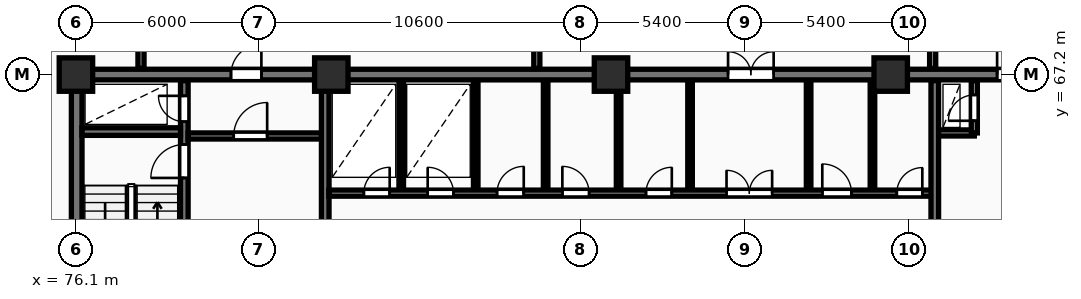
"""IFC4 building model, lengths in metres.
Left out: names, types, materials, properties, quantities, classifications, styles, units other than length and angle.
Written with IfcOpenShell. Run it as: python <this file> out.ifc"""

import sys

from ifc_helpers import new_model, si_unit, direction, frame, frame_2d, origin, origin_2d, place, context, subcontext, project, spatial, rectangle, extrude, element, fill, save


model = new_model("IFC4")
c1 = context("Model", 3, precision=1e-05, world=origin(), true_north=direction((0.0, 1.0)))
c2 = subcontext(c1, "Body", "Model", "MODEL_VIEW")
j1 = project(units=[si_unit("LENGTHUNIT", "METRE"), si_unit("PLANEANGLEUNIT", "RADIAN")], contexts=[c1])
p1 = place(None, origin())
s1 = spatial("IfcSite", under=j1, at=p1, CompositionType="ELEMENT")
p2 = place(p1, origin())
s2 = spatial("IfcBuilding", under=s1, at=p2, CompositionType="ELEMENT")
p3 = place(p2, frame((0.0, 0.0, 19.0)))
s3 = spatial("IfcBuildingStorey", under=s2, at=p3, CompositionType="ELEMENT", Elevation=19.0)
for number, where, z_axis, x_axis in (
    (1, (76.1, 67.2, 0.0), (0.0, 0.0, 1.0), (1.0, 0.0, 0.0)),
    (2, (84.5, 67.2, 0.0), (0.0, 0.0, 1.0), (1.0, 0.0, 0.0)),
    (3, (93.7, 67.2, 0.0), (0.0, 0.0, 1.0), (1.0, 0.0, 0.0)),
    (4, (102.9, 67.2, 0.0), (0.0, 0.0, 1.0), (1.0, 0.0, 0.0)),
):
    element("IfcColumn", number, at=place(p3, frame(where, z_axis=z_axis, x_axis=x_axis)), inside=s3, PredefinedType="COLUMN", context=c2, shape_type="SweptSolid", body=[
        extrude(rectangle(XDim=1.1, YDim=1.1, at=origin_2d()), origin(), (0.0, 0.0, 1.0), 5.0),
    ])
p4 = place(p3, frame((76.125, 55.375, 0.0), z_axis=(0.0, 0.0, 1.0), x_axis=(0.0, 1.0, 0.0)))
e5 = element("IfcWall", 5, at=p4, inside=s3, PredefinedType="SHEAR", context=c2, shape_type="SweptSolid", body=[
    extrude(rectangle(XDim=11.65, YDim=0.35, at=frame_2d((5.825, 0.0))), origin(), (0.0, 0.0, 1.0), 5.0),
])
p5 = place(p3, frame((75.95, 67.2, 0.0), z_axis=(0.0, 0.0, 1.0), x_axis=(1.0, 0.0, 0.0)))
e6 = element("IfcWall", 6, at=p5, inside=s3, PredefinedType="SHEAR", context=c2, shape_type="SweptSolid", body=[
    extrude(rectangle(XDim=36.3, YDim=0.35, at=frame_2d((18.15, 0.0))), origin(), (0.0, 0.0, 1.0), 5.0),
])
p6 = place(p5, frame((5.25, 0.0, 0.0)))
e7 = element("IfcOpeningElement", 7, at=p6, cuts=e6, PredefinedType="OPENING", context=c2, shape_type="SweptSolid", body=[
    extrude(rectangle(XDim=1.0, YDim=2.15, at=frame_2d((0.5, 1.075))), frame((0.0, 0.185, 0.0), z_axis=(0.0, -1.0, 0.0), x_axis=(1.0, 0.0, 0.0)), (0.0, 0.0, 1.0), 0.37),
])
p7 = place(p5, frame((21.6, 0.0, 0.0)))
e8 = element("IfcOpeningElement", 8, at=p7, cuts=e6, PredefinedType="OPENING", context=c2, shape_type="SweptSolid", body=[
    extrude(rectangle(XDim=1.5, YDim=2.2, at=frame_2d((0.75, 1.1))), frame((0.0, 0.185, 0.0), z_axis=(0.0, -1.0, 0.0), x_axis=(1.0, 0.0, 0.0)), (0.0, 0.0, 1.0), 0.37),
])
p8 = place(p5, frame((30.45, 0.0, 0.0)))
e9 = element("IfcOpeningElement", 9, at=p8, cuts=e6, PredefinedType="OPENING", context=c2, shape_type="SweptSolid", body=[
    extrude(rectangle(XDim=1.0, YDim=2.15, at=frame_2d((0.5, 1.075))), frame((0.0, 0.185, 0.0), z_axis=(0.0, -1.0, 0.0), x_axis=(1.0, 0.0, 0.0)), (0.0, 0.0, 1.0), 0.37),
])
p9 = place(p3, frame((79.665, 55.4, 0.0), z_axis=(0.0, 0.0, 1.0), x_axis=(0.0, 1.0, 0.0)))
e10 = element("IfcWall", 10, at=p9, inside=s3, PredefinedType="SHEAR", context=c2, shape_type="SweptSolid", body=[
    extrude(rectangle(XDim=11.6, YDim=0.25, at=frame_2d((5.8, 0.0))), origin(), (0.0, 0.0, 1.0), 5.0),
])
p10 = place(p9, frame((0.55, 0.0, 0.0)))
e11 = element("IfcOpeningElement", 11, at=p10, cuts=e10, PredefinedType="OPENING", context=c2, shape_type="SweptSolid", body=[
    extrude(rectangle(XDim=0.85, YDim=2.05, at=frame_2d((0.425, 1.025))), frame((0.0, 0.135, 0.0), z_axis=(0.0, -1.0, 0.0), x_axis=(1.0, 0.0, 0.0)), (0.0, 0.0, 1.0), 0.27),
])
p11 = place(p9, frame((8.4, 0.0, 0.0)))
e12 = element("IfcOpeningElement", 12, at=p11, cuts=e10, PredefinedType="OPENING", context=c2, shape_type="SweptSolid", body=[
    extrude(rectangle(XDim=1.1, YDim=2.1, at=frame_2d((0.55, 1.05))), frame((0.0, 0.135, 0.0), z_axis=(0.0, -1.0, 0.0), x_axis=(1.0, 0.0, 0.0)), (0.0, 0.0, 1.0), 0.27),
])
p12 = place(p9, frame((10.25, 0.0, 0.0)))
e13 = element("IfcOpeningElement", 13, at=p12, cuts=e10, PredefinedType="OPENING", context=c2, shape_type="SweptSolid", body=[
    extrude(rectangle(XDim=0.85, YDim=2.05, at=frame_2d((0.425, 1.025))), frame((0.0, 0.135, 0.0), z_axis=(0.0, -1.0, 0.0), x_axis=(1.0, 0.0, 0.0)), (0.0, 0.0, 1.0), 0.27),
])
p13 = place(p3, frame((76.3, 65.325, 0.0), z_axis=(0.0, 0.0, 1.0), x_axis=(1.0, 0.0, 0.0)))
e14 = element("IfcWall", 14, at=p13, inside=s3, PredefinedType="SHEAR", context=c2, shape_type="SweptSolid", body=[
    extrude(rectangle(XDim=3.24, YDim=0.25, at=frame_2d((1.62, 0.0))), origin(), (0.0, 0.0, 1.0), 5.0),
])
p14 = place(p3, frame((79.79, 65.18, 0.0), z_axis=(0.0, 0.0, 1.0), x_axis=(1.0, 0.0, 0.0)))
e15 = element("IfcWall", 15, at=p14, inside=s3, PredefinedType="PARTITIONING", context=c2, shape_type="SweptSolid", body=[
    extrude(rectangle(XDim=4.39, YDim=0.2, at=frame_2d((2.195, 0.0))), origin(), (0.0, 0.0, 1.0), 4.68),
])
p15 = place(p14, frame((1.5, 0.0, 0.0)))
e16 = element("IfcOpeningElement", 16, at=p15, cuts=e15, PredefinedType="OPENING", context=c2, shape_type="SweptSolid", body=[
    extrude(rectangle(XDim=1.1, YDim=2.1, at=frame_2d((0.55, 1.05))), frame((0.0, 0.11, 0.0), z_axis=(0.0, -1.0, 0.0), x_axis=(1.0, 0.0, 0.0)), (0.0, 0.0, 1.0), 0.22),
])
p16 = place(p3, frame((84.3, 55.4, 0.0), z_axis=(0.0, 0.0, 1.0), x_axis=(0.0, 1.0, 0.0)))
e17 = element("IfcWall", 17, at=p16, inside=s3, PredefinedType="SHEAR", context=c2, shape_type="SweptSolid", body=[
    extrude(rectangle(XDim=11.6, YDim=0.25, at=frame_2d((5.8, 0.0))), origin(), (0.0, 0.0, 1.0), 5.0),
])
p17 = place(p16, frame((5.2, 0.0, 0.0)))
e18 = element("IfcOpeningElement", 18, at=p17, cuts=e17, PredefinedType="OPENING", context=c2, shape_type="SweptSolid", body=[
    extrude(rectangle(XDim=1.1, YDim=2.1, at=frame_2d((0.55, 1.05))), frame((0.0, 0.135, 0.0), z_axis=(0.0, -1.0, 0.0), x_axis=(1.0, 0.0, 0.0)), (0.0, 0.0, 1.0), 0.27),
])
for number, where, z_axis, x_axis in (
    (19, (86.8, 63.4, 0.0), (0.0, 0.0, 1.0), (0.0, 1.0, 0.0)),
    (20, (89.25, 63.4, 0.0), (0.0, 0.0, 1.0), (0.0, 1.0, 0.0)),
    (21, (91.55, 63.4, 0.0), (0.0, 0.0, 1.0), (0.0, 1.0, 0.0)),
):
    element("IfcWall", number, at=place(p3, frame(where, z_axis=z_axis, x_axis=x_axis)), inside=s3, PredefinedType="PARTITIONING", context=c2, shape_type="SweptSolid", body=[
        extrude(rectangle(XDim=3.6, YDim=0.15, at=frame_2d((1.8, 0.0))), origin(), (0.0, 0.0, 1.0), 4.68),
    ])
for number, where, z_axis, x_axis in (
    (22, (93.95, 63.4, 0.0), (0.0, 0.0, 1.0), (0.0, 1.0, 0.0)),
    (23, (102.3, 63.4, 0.0), (0.0, 0.0, 1.0), (0.0, 1.0, 0.0)),
):
    element("IfcWall", number, at=place(p3, frame(where, z_axis=z_axis, x_axis=x_axis)), inside=s3, PredefinedType="PARTITIONING", context=c2, shape_type="SweptSolid", body=[
        extrude(rectangle(XDim=3.6, YDim=0.15, at=frame_2d((1.8, 0.0))), origin(), (0.0, 0.0, 1.0), 3.43),
    ])
for number, where, z_axis, x_axis in (
    (24, (96.3, 63.4, 0.0), (0.0, 0.0, 1.0), (0.0, 1.0, 0.0)),
    (25, (100.2, 63.4, 0.0), (0.0, 0.0, 1.0), (0.0, 1.0, 0.0)),
):
    element("IfcWall", number, at=place(p3, frame(where, z_axis=z_axis, x_axis=x_axis)), inside=s3, PredefinedType="PARTITIONING", context=c2, shape_type="SweptSolid", body=[
        extrude(rectangle(XDim=3.6, YDim=0.15, at=frame_2d((1.8, 0.0))), origin(), (0.0, 0.0, 1.0), 4.68),
    ])
p18 = place(p3, frame((84.42, 63.3, 0.0), z_axis=(0.0, 0.0, 1.0), x_axis=(1.0, 0.0, 0.0)))
e26 = element("IfcWall", 26, at=p18, inside=s3, PredefinedType="PARTITIONING", context=c2, shape_type="SweptSolid", body=[
    extrude(rectangle(XDim=19.83, YDim=0.2, at=frame_2d((9.915, 0.0))), origin(), (0.0, 0.0, 1.0), 4.68),
])
p19 = place(p18, frame((1.15, 0.0, 0.0)))
e27 = element("IfcOpeningElement", 27, at=p19, cuts=e26, PredefinedType="OPENING", context=c2, shape_type="SweptSolid", body=[
    extrude(rectangle(XDim=0.85, YDim=2.05, at=frame_2d((0.425, 1.025))), frame((0.0, 0.11, 0.0), z_axis=(0.0, -1.0, 0.0), x_axis=(1.0, 0.0, 0.0)), (0.0, 0.0, 1.0), 0.22),
])
p20 = place(p18, frame((3.25, 0.0, 0.0)))
e28 = element("IfcOpeningElement", 28, at=p20, cuts=e26, PredefinedType="OPENING", context=c2, shape_type="SweptSolid", body=[
    extrude(rectangle(XDim=0.85, YDim=2.05, at=frame_2d((0.425, 1.025))), frame((0.0, 0.11, 0.0), z_axis=(0.0, -1.0, 0.0), x_axis=(1.0, 0.0, 0.0)), (0.0, 0.0, 1.0), 0.22),
])
p21 = place(p18, frame((13.08, 0.0, 0.0)))
e29 = element("IfcOpeningElement", 29, at=p21, cuts=e26, PredefinedType="OPENING", context=c2, shape_type="SweptSolid", body=[
    extrude(rectangle(XDim=1.5, YDim=2.2, at=frame_2d((0.75, 1.1))), frame((0.0, 0.11, 0.0), z_axis=(0.0, -1.0, 0.0), x_axis=(1.0, 0.0, 0.0)), (0.0, 0.0, 1.0), 0.22),
])
p22 = place(p18, frame((5.53, 0.0, 0.0)))
e30 = element("IfcOpeningElement", 30, at=p22, cuts=e26, PredefinedType="OPENING", context=c2, shape_type="SweptSolid", body=[
    extrude(rectangle(XDim=0.88, YDim=2.06, at=frame_2d((0.44, 1.03))), frame((0.0, 0.11, 0.0), z_axis=(0.0, -1.0, 0.0), x_axis=(1.0, 0.0, 0.0)), (0.0, 0.0, 1.0), 0.22),
])
p23 = place(p18, frame((7.68, 0.0, 0.0)))
e31 = element("IfcOpeningElement", 31, at=p23, cuts=e26, PredefinedType="OPENING", context=c2, shape_type="SweptSolid", body=[
    extrude(rectangle(XDim=0.88, YDim=2.06, at=frame_2d((0.44, 1.03))), frame((0.0, 0.11, 0.0), z_axis=(0.0, -1.0, 0.0), x_axis=(1.0, 0.0, 0.0)), (0.0, 0.0, 1.0), 0.22),
])
p24 = place(p18, frame((10.43, 0.0, 0.0)))
e32 = element("IfcOpeningElement", 32, at=p24, cuts=e26, PredefinedType="OPENING", context=c2, shape_type="SweptSolid", body=[
    extrude(rectangle(XDim=0.85, YDim=2.05, at=frame_2d((0.425, 1.025))), frame((0.0, 0.11, 0.0), z_axis=(0.0, -1.0, 0.0), x_axis=(1.0, 0.0, 0.0)), (0.0, 0.0, 1.0), 0.22),
])
p25 = place(p18, frame((16.23, 0.0, 0.0)))
e33 = element("IfcOpeningElement", 33, at=p25, cuts=e26, PredefinedType="OPENING", context=c2, shape_type="SweptSolid", body=[
    extrude(rectangle(XDim=0.96, YDim=2.1, at=frame_2d((0.48, 1.05))), frame((0.0, 0.11, 0.0), z_axis=(0.0, -1.0, 0.0), x_axis=(1.0, 0.0, 0.0)), (0.0, 0.0, 1.0), 0.22),
])
p26 = place(p18, frame((18.68, 0.0, 0.0)))
e34 = element("IfcOpeningElement", 34, at=p26, cuts=e26, PredefinedType="OPENING", context=c2, shape_type="SweptSolid", body=[
    extrude(rectangle(XDim=0.84, YDim=2.04, at=frame_2d((0.42, 1.02))), frame((0.0, 0.11, 0.0), z_axis=(0.0, -1.0, 0.0), x_axis=(1.0, 0.0, 0.0)), (0.0, 0.0, 1.0), 0.22),
])
p27 = place(p3, frame((104.45, 65.28, 0.0), z_axis=(0.0, 0.0, 1.0), x_axis=(1.0, 0.0, 0.0)))
e35 = element("IfcWall", 35, at=p27, inside=s3, PredefinedType="PARTITIONING", context=c2, shape_type="SweptSolid", body=[
    extrude(rectangle(XDim=1.2, YDim=0.2, at=frame_2d((0.6, 0.0))), origin(), (0.0, 0.0, 1.0), 4.68),
])
p28 = place(p3, frame((105.65, 65.28, 0.0), z_axis=(0.0, 0.0, 1.0), x_axis=(0.0, 1.0, 0.0)))
e36 = element("IfcWall", 36, at=p28, inside=s3, PredefinedType="PARTITIONING", context=c2, shape_type="SweptSolid", body=[
    extrude(rectangle(XDim=1.72, YDim=0.2, at=frame_2d((0.86, 0.0))), origin(), (0.0, 0.0, 1.0), 4.68),
])
p29 = place(p28, frame((0.4, 0.0, 0.0)))
e37 = element("IfcOpeningElement", 37, at=p29, cuts=e36, PredefinedType="OPENING", context=c2, shape_type="SweptSolid", body=[
    extrude(rectangle(XDim=0.85, YDim=2.05, at=frame_2d((0.425, 1.025))), frame((0.0, 0.11, 0.0), z_axis=(0.0, -1.0, 0.0), x_axis=(1.0, 0.0, 0.0)), (0.0, 0.0, 1.0), 0.22),
])
p30 = place(p3, frame((104.35, 58.4, 0.0), z_axis=(0.0, 0.0, 1.0), x_axis=(0.0, 1.0, 0.0)))
e38 = element("IfcWall", 38, at=p30, inside=s3, PredefinedType="SHEAR", context=c2, shape_type="SweptSolid", body=[
    extrude(rectangle(XDim=8.6, YDim=0.25, at=frame_2d((4.3, 0.0))), origin(), (0.0, 0.0, 1.0), 5.0),
])
p31 = place(p30, frame((1.8, 0.0, 0.0)))
e39 = element("IfcOpeningElement", 39, at=p31, cuts=e38, PredefinedType="OPENING", context=c2, shape_type="SweptSolid", body=[
    extrude(rectangle(XDim=1.1, YDim=2.1, at=frame_2d((0.55, 1.05))), frame((0.0, 0.135, 0.0), z_axis=(0.0, -1.0, 0.0), x_axis=(1.0, 0.0, 0.0)), (0.0, 0.0, 1.0), 0.27),
])
p32 = place(p3, frame((78.24, 67.4, 0.0), z_axis=(0.0, 0.0, 1.0), x_axis=(0.0, 1.0, 0.0)))
e40 = element("IfcWall", 40, at=p32, inside=s3, PredefinedType="PARTITIONING", context=c2, shape_type="SweptSolid", body=[
    extrude(rectangle(XDim=23.25, YDim=0.2, at=frame_2d((11.625, 0.0))), origin(), (0.0, 0.0, 1.0), 4.68),
])
p33 = place(p32, frame((8.852, 0.0, 0.0)))
e41 = element("IfcOpeningElement", 41, at=p33, cuts=e40, PredefinedType="OPENING", context=c2, shape_type="SweptSolid", body=[
    extrude(rectangle(XDim=1.22, YDim=2.18, at=frame_2d((0.61, 1.09))), frame((0.0, 0.11, 0.0), z_axis=(0.0, -1.0, 0.0), x_axis=(1.0, 0.0, 0.0)), (0.0, 0.0, 1.0), 0.22),
])
p34 = place(p3, frame((91.26, 67.4, 0.0), z_axis=(0.0, 0.0, 1.0), x_axis=(0.0, 1.0, 0.0)))
e42 = element("IfcWall", 42, at=p34, inside=s3, PredefinedType="PARTITIONING", context=c2, shape_type="SweptSolid", body=[
    extrude(rectangle(XDim=23.25, YDim=0.2, at=frame_2d((11.625, 0.0))), origin(), (0.0, 0.0, 1.0), 4.68),
])
p35 = place(p34, frame((8.852, 0.0, 0.0)))
e43 = element("IfcOpeningElement", 43, at=p35, cuts=e42, PredefinedType="OPENING", context=c2, shape_type="SweptSolid", body=[
    extrude(rectangle(XDim=1.22, YDim=2.18, at=frame_2d((0.61, 1.09))), frame((0.0, 0.11, 0.0), z_axis=(0.0, -1.0, 0.0), x_axis=(1.0, 0.0, 0.0)), (0.0, 0.0, 1.0), 0.22),
])
p36 = place(p3, frame((104.28, 67.4, 0.0), z_axis=(0.0, 0.0, 1.0), x_axis=(0.0, 1.0, 0.0)))
e44 = element("IfcWall", 44, at=p36, inside=s3, PredefinedType="PARTITIONING", context=c2, shape_type="SweptSolid", body=[
    extrude(rectangle(XDim=23.25, YDim=0.2, at=frame_2d((11.625, 0.0))), origin(), (0.0, 0.0, 1.0), 4.68),
])
p37 = place(p36, frame((8.852, 0.0, 0.0)))
e45 = element("IfcOpeningElement", 45, at=p37, cuts=e44, PredefinedType="OPENING", context=c2, shape_type="SweptSolid", body=[
    extrude(rectangle(XDim=1.22, YDim=2.18, at=frame_2d((0.61, 1.09))), frame((0.0, 0.11, 0.0), z_axis=(0.0, -1.0, 0.0), x_axis=(1.0, 0.0, 0.0)), (0.0, 0.0, 1.0), 0.22),
])
p38 = place(p6, origin())
e46 = element("IfcDoor", 46, at=p38, inside=s3, OperationType="SINGLE_SWING_RIGHT", PredefinedType="DOOR", context=c2, shape_type="SweptSolid", body=[
    extrude(rectangle(XDim=1.0, YDim=2.15, at=frame_2d((0.5, 1.075))), frame((0.0, 0.025, 0.0), z_axis=(0.0, -1.0, 0.0), x_axis=(1.0, 0.0, 0.0)), (0.0, 0.0, 1.0), 0.05),
])
fill(e7, e46)
p39 = place(p7, origin())
e47 = element("IfcDoor", 47, at=p39, inside=s3, OperationType="DOUBLE_DOOR_SINGLE_SWING", PredefinedType="DOOR", context=c2, shape_type="SweptSolid", body=[
    extrude(rectangle(XDim=1.5, YDim=2.2, at=frame_2d((0.75, 1.1))), frame((0.0, 0.025, 0.0), z_axis=(0.0, -1.0, 0.0), x_axis=(1.0, 0.0, 0.0)), (0.0, 0.0, 1.0), 0.05),
])
fill(e8, e47)
p40 = place(p8, origin())
e48 = element("IfcDoor", 48, at=p40, inside=s3, OperationType="SINGLE_SWING_LEFT", PredefinedType="DOOR", context=c2, shape_type="SweptSolid", body=[
    extrude(rectangle(XDim=1.0, YDim=2.15, at=frame_2d((0.5, 1.075))), frame((0.0, 0.025, 0.0), z_axis=(0.0, -1.0, 0.0), x_axis=(1.0, 0.0, 0.0)), (0.0, 0.0, 1.0), 0.05),
])
fill(e9, e48)
p41 = place(p11, origin())
e49 = element("IfcDoor", 49, at=p41, inside=s3, OperationType="SINGLE_SWING_LEFT", PredefinedType="DOOR", context=c2, shape_type="SweptSolid", body=[
    extrude(rectangle(XDim=1.1, YDim=2.1, at=frame_2d((0.55, 1.05))), frame((0.0, 0.025, 0.0), z_axis=(0.0, -1.0, 0.0), x_axis=(1.0, 0.0, 0.0)), (0.0, 0.0, 1.0), 0.05),
])
fill(e12, e49)
p42 = place(p12, origin())
e50 = element("IfcDoor", 50, at=p42, inside=s3, OperationType="SINGLE_SWING_RIGHT", PredefinedType="DOOR", context=c2, shape_type="SweptSolid", body=[
    extrude(rectangle(XDim=0.85, YDim=2.05, at=frame_2d((0.425, 1.025))), frame((0.0, 0.025, 0.0), z_axis=(0.0, -1.0, 0.0), x_axis=(1.0, 0.0, 0.0)), (0.0, 0.0, 1.0), 0.05),
])
fill(e13, e50)
p43 = place(p15, origin())
e51 = element("IfcDoor", 51, at=p43, inside=s3, OperationType="SINGLE_SWING_RIGHT", PredefinedType="DOOR", context=c2, shape_type="SweptSolid", body=[
    extrude(rectangle(XDim=1.1, YDim=2.1, at=frame_2d((0.55, 1.05))), frame((0.0, 0.025, 0.0), z_axis=(0.0, -1.0, 0.0), x_axis=(1.0, 0.0, 0.0)), (0.0, 0.0, 1.0), 0.05),
])
fill(e16, e51)
p44 = place(p19, origin())
e52 = element("IfcDoor", 52, at=p44, inside=s3, OperationType="SINGLE_SWING_RIGHT", PredefinedType="DOOR", context=c2, shape_type="SweptSolid", body=[
    extrude(rectangle(XDim=0.85, YDim=2.05, at=frame_2d((0.425, 1.025))), frame((0.0, 0.025, 0.0), z_axis=(0.0, -1.0, 0.0), x_axis=(1.0, 0.0, 0.0)), (0.0, 0.0, 1.0), 0.05),
])
fill(e27, e52)
p45 = place(p20, origin())
e53 = element("IfcDoor", 53, at=p45, inside=s3, OperationType="SINGLE_SWING_LEFT", PredefinedType="DOOR", context=c2, shape_type="SweptSolid", body=[
    extrude(rectangle(XDim=0.85, YDim=2.05, at=frame_2d((0.425, 1.025))), frame((0.0, 0.025, 0.0), z_axis=(0.0, -1.0, 0.0), x_axis=(1.0, 0.0, 0.0)), (0.0, 0.0, 1.0), 0.05),
])
fill(e28, e53)
p46 = place(p21, origin())
e54 = element("IfcDoor", 54, at=p46, inside=s3, OperationType="DOUBLE_DOOR_SINGLE_SWING", PredefinedType="DOOR", context=c2, shape_type="SweptSolid", body=[
    extrude(rectangle(XDim=1.5, YDim=2.2, at=frame_2d((0.75, 1.1))), frame((0.0, 0.025, 0.0), z_axis=(0.0, -1.0, 0.0), x_axis=(1.0, 0.0, 0.0)), (0.0, 0.0, 1.0), 0.05),
])
fill(e29, e54)
p47 = place(p22, origin())
e55 = element("IfcDoor", 55, at=p47, inside=s3, OperationType="SINGLE_SWING_RIGHT", PredefinedType="DOOR", context=c2, shape_type="SweptSolid", body=[
    extrude(rectangle(XDim=0.88, YDim=2.06, at=frame_2d((0.44, 1.03))), frame((0.0, 0.025, 0.0), z_axis=(0.0, -1.0, 0.0), x_axis=(1.0, 0.0, 0.0)), (0.0, 0.0, 1.0), 0.05),
])
fill(e30, e55)
p48 = place(p23, origin())
e56 = element("IfcDoor", 56, at=p48, inside=s3, OperationType="SINGLE_SWING_LEFT", PredefinedType="DOOR", context=c2, shape_type="SweptSolid", body=[
    extrude(rectangle(XDim=0.88, YDim=2.06, at=frame_2d((0.44, 1.03))), frame((0.0, 0.025, 0.0), z_axis=(0.0, -1.0, 0.0), x_axis=(1.0, 0.0, 0.0)), (0.0, 0.0, 1.0), 0.05),
])
fill(e31, e56)
p49 = place(p24, origin())
e57 = element("IfcDoor", 57, at=p49, inside=s3, OperationType="SINGLE_SWING_RIGHT", PredefinedType="DOOR", context=c2, shape_type="SweptSolid", body=[
    extrude(rectangle(XDim=0.85, YDim=2.05, at=frame_2d((0.425, 1.025))), frame((0.0, 0.025, 0.0), z_axis=(0.0, -1.0, 0.0), x_axis=(1.0, 0.0, 0.0)), (0.0, 0.0, 1.0), 0.05),
])
fill(e32, e57)
p50 = place(p25, origin())
e58 = element("IfcDoor", 58, at=p50, inside=s3, OperationType="SINGLE_SWING_LEFT", PredefinedType="DOOR", context=c2, shape_type="SweptSolid", body=[
    extrude(rectangle(XDim=0.96, YDim=2.1, at=frame_2d((0.48, 1.05))), frame((0.0, 0.025, 0.0), z_axis=(0.0, -1.0, 0.0), x_axis=(1.0, 0.0, 0.0)), (0.0, 0.0, 1.0), 0.05),
])
fill(e33, e58)
p51 = place(p26, origin())
e59 = element("IfcDoor", 59, at=p51, inside=s3, OperationType="SINGLE_SWING_RIGHT", PredefinedType="DOOR", context=c2, shape_type="SweptSolid", body=[
    extrude(rectangle(XDim=0.84, YDim=2.04, at=frame_2d((0.42, 1.02))), frame((0.0, 0.025, 0.0), z_axis=(0.0, -1.0, 0.0), x_axis=(1.0, 0.0, 0.0)), (0.0, 0.0, 1.0), 0.05),
])
fill(e34, e59)
p52 = place(p29, origin())
e60 = element("IfcDoor", 60, at=p52, inside=s3, OperationType="SINGLE_SWING_LEFT", PredefinedType="DOOR", context=c2, shape_type="SweptSolid", body=[
    extrude(rectangle(XDim=0.85, YDim=2.05, at=frame_2d((0.425, 1.025))), frame((0.0, 0.025, 0.0), z_axis=(0.0, -1.0, 0.0), x_axis=(1.0, 0.0, 0.0)), (0.0, 0.0, 1.0), 0.05),
])
fill(e37, e60)
save(model, sys.argv[1])
